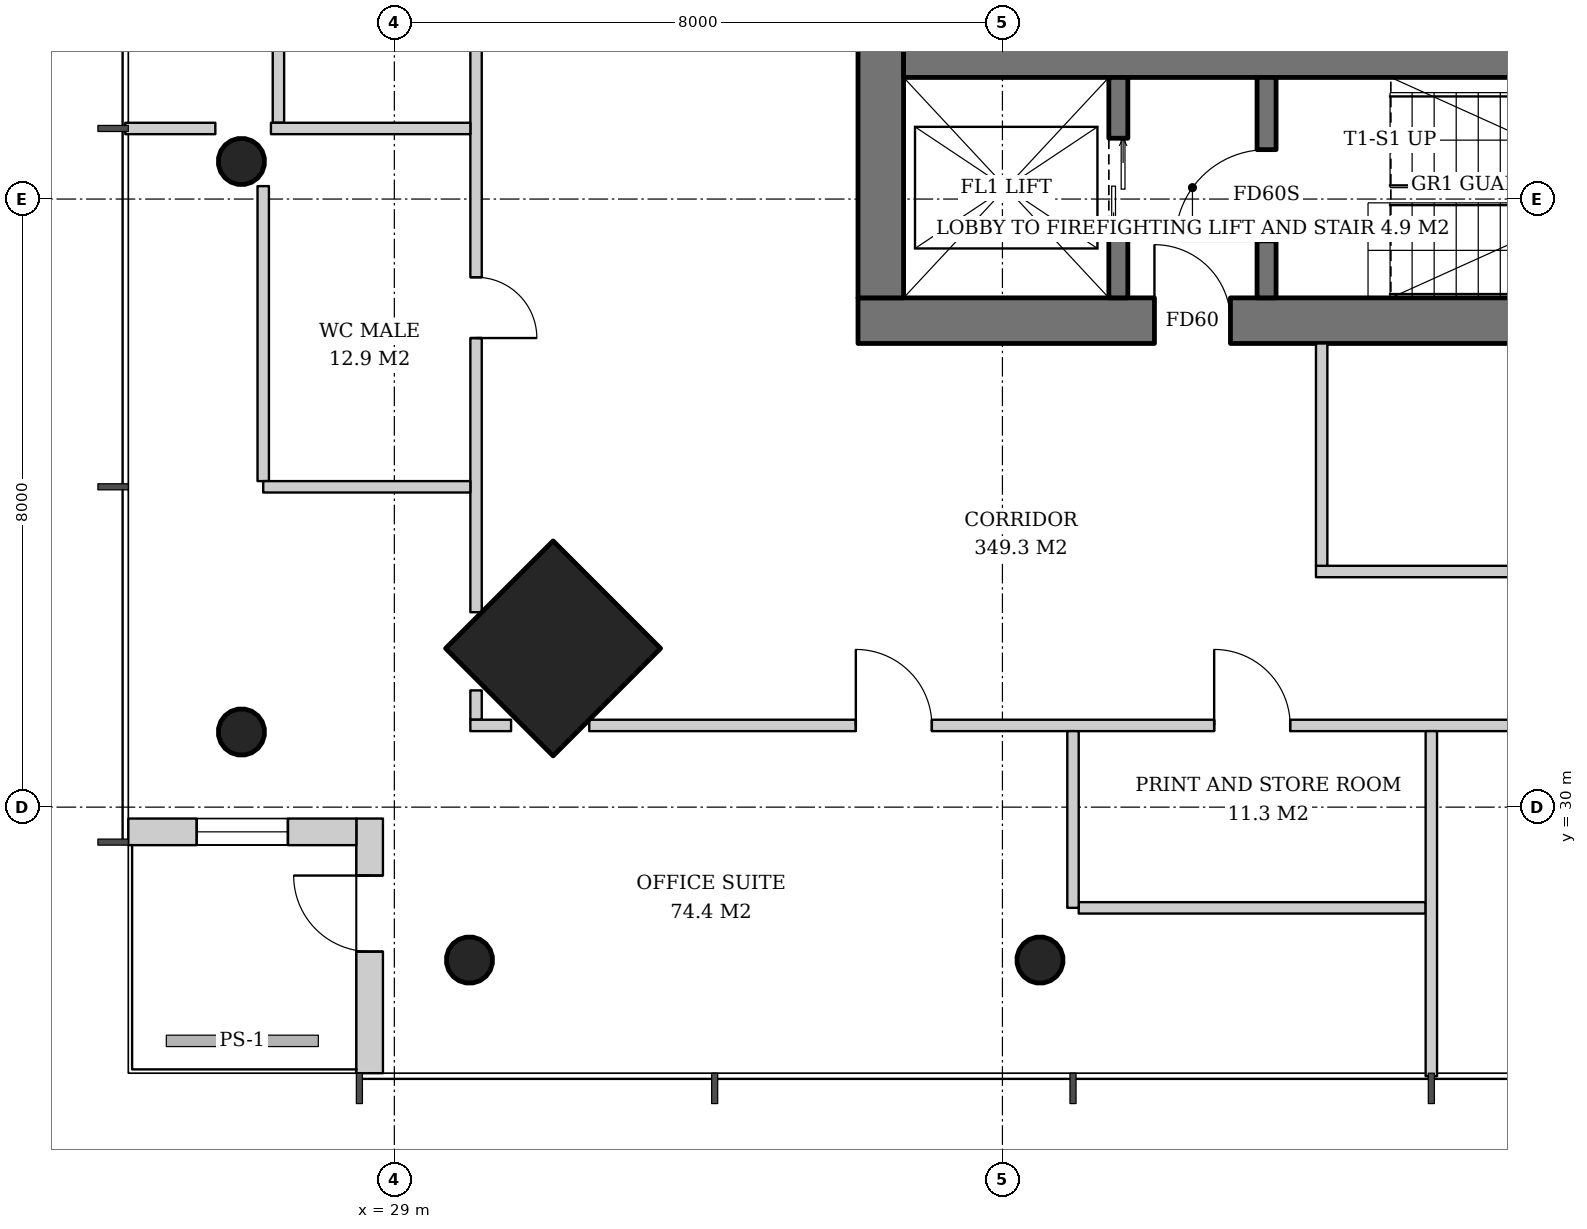
"""IFC4 building model, lengths in metres.
Left out: names, types, materials, properties, quantities, classifications, styles, units other than length and angle.
Written with IfcOpenShell. Run it as: python <this file> out.ifc"""

import sys

from ifc_helpers import new_model, si_unit, direction, frame, frame_2d, origin, origin_2d, place, context, subcontext, project, spatial, rectangle, hollow_circle, extrude, element, fill, save


model = new_model("IFC4")
c1 = context("Model", 3, precision=1e-05, world=origin(), true_north=direction((0.0, 1.0)))
c2 = subcontext(c1, "Body", "Model", "MODEL_VIEW")
j1 = project(units=[si_unit("LENGTHUNIT", "METRE"), si_unit("PLANEANGLEUNIT", "RADIAN")], contexts=[c1])
p1 = place(None, origin())
s1 = spatial("IfcSite", under=j1, at=p1, CompositionType="ELEMENT")
p2 = place(p1, origin())
s2 = spatial("IfcBuilding", under=s1, at=p2, CompositionType="ELEMENT")
p3 = place(p2, frame((0.0, 0.0, 207.2)))
s3 = spatial("IfcBuildingStorey", under=s2, at=p3, CompositionType="ELEMENT", Elevation=207.2)
p4 = place(p3, frame((31.05, 32.05, 0.0), z_axis=(0.031898107953, 0.031898107953, 0.998981992539), x_axis=(-0.707106781187, 0.707106781187, 0.0)))
e1 = element("IfcColumn", 1, at=p4, inside=s3, PredefinedType="COLUMN", context=c2, shape_type="SweptSolid", body=[
    extrude(rectangle(XDim=2.0, YDim=2.0, at=origin_2d()), origin(), (0.0, 0.0, 1.0), 3.804),
])
p5 = place(p3, frame((26.95, 30.95, 0.0), z_axis=(0.031962158256, 0.031962158256, 0.998977898093), x_axis=(-0.707106781187, 0.707106781187, 0.0)))
e2 = element("IfcColumn", 2, at=p5, inside=s3, PredefinedType="COLUMN", context=c2, shape_type="SweptSolid", body=[
    extrude(hollow_circle(Radius=0.305, WallThickness=0.025, at=origin_2d()), origin(), (0.0, 0.0, 1.0), 3.804),
])
p6 = place(p3, frame((26.95, 38.475, 0.0), z_axis=(0.031974442509, 0.015923015547, 0.999361842679), x_axis=(-0.445775033553, 0.895145027055, 0.0)))
e3 = element("IfcColumn", 3, at=p6, inside=s3, PredefinedType="COLUMN", context=c2, shape_type="SweptSolid", body=[
    extrude(hollow_circle(Radius=0.305, WallThickness=0.025, at=origin_2d()), origin(), (0.0, 0.0, 1.0), 3.802),
])
p7 = place(p3, frame((29.95, 27.95, 0.0), z_axis=(0.031962158256, 0.031962158256, 0.998977898093), x_axis=(-0.707106781187, 0.707106781187, 0.0)))
e4 = element("IfcColumn", 4, at=p7, inside=s3, PredefinedType="COLUMN", context=c2, shape_type="SweptSolid", body=[
    extrude(hollow_circle(Radius=0.305, WallThickness=0.025, at=origin_2d()), origin(), (0.0, 0.0, 1.0), 3.804),
])
p8 = place(p3, frame((37.475, 27.95, 0.0), z_axis=(0.015923015547, 0.031974442509, 0.999361842679), x_axis=(-0.895145027055, 0.445775033553, 0.0)))
e5 = element("IfcColumn", 5, at=p8, inside=s3, PredefinedType="COLUMN", context=c2, shape_type="SweptSolid", body=[
    extrude(hollow_circle(Radius=0.305, WallThickness=0.025, at=origin_2d()), origin(), (0.0, 0.0, 1.0), 3.802),
])
p9 = place(p3, frame((35.1, 36.4, 0.0), z_axis=(0.0, 0.0, 1.0), x_axis=(1.0, 0.0, 0.0)))
e6 = element("IfcWall", 6, at=p9, inside=s3, PredefinedType="SHEAR", context=c2, shape_type="SweptSolid", body=[
    extrude(rectangle(XDim=19.8, YDim=0.6, at=frame_2d((9.9, 0.0))), origin(), (0.0, 0.0, 1.0), 3.8),
])
p10 = place(p9, frame((3.9, 0.0, 0.0)))
e7 = element("IfcOpeningElement", 7, at=p10, cuts=e6, PredefinedType="OPENING", context=c2, shape_type="SweptSolid", body=[
    extrude(rectangle(XDim=1.0, YDim=2.1, at=frame_2d((0.5, 1.05))), frame((0.0, 0.31, 0.0), z_axis=(0.0, -1.0, 0.0), x_axis=(1.0, 0.0, 0.0)), (0.0, 0.0, 1.0), 0.62),
])
p11 = place(p9, frame((15.35, 0.0, 0.0)))
e8 = element("IfcOpeningElement", 8, at=p11, cuts=e6, PredefinedType="OPENING", context=c2, shape_type="SweptSolid", body=[
    extrude(rectangle(XDim=1.0, YDim=2.1, at=frame_2d((0.5, 1.05))), frame((0.0, 0.31, 0.0), z_axis=(0.0, -1.0, 0.0), x_axis=(1.0, 0.0, 0.0)), (0.0, 0.0, 1.0), 0.62),
])
p12 = place(p3, frame((35.4, 36.7, 0.0), z_axis=(0.0, 0.0, 1.0), x_axis=(0.0, 1.0, 0.0)))
e9 = element("IfcWall", 9, at=p12, inside=s3, PredefinedType="SHEAR", context=c2, shape_type="SweptSolid", body=[
    extrude(rectangle(XDim=18.6, YDim=0.6, at=frame_2d((9.3, 0.0))), origin(), (0.0, 0.0, 1.0), 3.8),
])
p13 = place(p12, frame((8.4, 0.0, 0.0)))
e10 = element("IfcOpeningElement", 10, at=p13, cuts=e9, PredefinedType="OPENING", context=c2, shape_type="SweptSolid", body=[
    extrude(rectangle(XDim=1.8, YDim=2.4, at=frame_2d((0.9, 1.2))), frame((0.0, 0.31, 0.0), z_axis=(0.0, -1.0, 0.0), x_axis=(1.0, 0.0, 0.0)), (0.0, 0.0, 1.0), 0.62),
])
p14 = place(p3, frame((35.7, 39.8, 0.0), z_axis=(0.0, 0.0, 1.0), x_axis=(1.0, 0.0, 0.0)))
e11 = element("IfcWall", 11, at=p14, inside=s3, PredefinedType="SHEAR", context=c2, shape_type="SweptSolid", body=[
    extrude(rectangle(XDim=18.6, YDim=0.4, at=frame_2d((9.3, 0.0))), origin(), (0.0, 0.0, 1.0), 3.8),
])
p15 = place(p3, frame((28.675, 26.5, 0.0), z_axis=(0.0, 0.0, 1.0), x_axis=(0.0, 1.0, 0.0)))
e12 = element("IfcWall", 12, at=p15, inside=s3, PredefinedType="SOLIDWALL", context=c2, shape_type="SweptSolid", body=[
    extrude(rectangle(XDim=3.35, YDim=0.35, at=frame_2d((1.675, 0.0))), origin(), (0.0, 0.0, 1.0), 3.62),
])
p16 = place(p15, frame((1.6, 0.0, 0.0)))
e13 = element("IfcOpeningElement", 13, at=p16, cuts=e12, PredefinedType="OPENING", context=c2, shape_type="SweptSolid", body=[
    extrude(rectangle(XDim=1.0, YDim=2.4, at=frame_2d((0.5, 1.2))), frame((0.0, 0.185, 0.0), z_axis=(0.0, -1.0, 0.0), x_axis=(1.0, 0.0, 0.0)), (0.0, 0.0, 1.0), 0.37),
])
p17 = place(p3, frame((28.5, 29.675, 0.0), z_axis=(0.0, 0.0, 1.0), x_axis=(-1.0, 0.0, 0.0)))
e14 = element("IfcWall", 14, at=p17, inside=s3, PredefinedType="SOLIDWALL", context=c2, shape_type="SweptSolid", body=[
    extrude(rectangle(XDim=3.0, YDim=0.35, at=frame_2d((1.5, 0.0))), origin(), (0.0, 0.0, 1.0), 3.62),
])
p18 = place(p17, frame((0.9, 0.0, 0.6)))
e15 = element("IfcOpeningElement", 15, at=p18, cuts=e14, PredefinedType="OPENING", context=c2, shape_type="SweptSolid", body=[
    extrude(rectangle(XDim=1.2, YDim=2.55, at=frame_2d((0.6, 1.275))), frame((0.0, 0.185, 0.0), z_axis=(0.0, -1.0, 0.0), x_axis=(1.0, 0.0, 0.0)), (0.0, 0.0, 1.0), 0.37),
])
p19 = place(p3, frame((38.525, 36.7, 0.0), z_axis=(0.0, 0.0, 1.0), x_axis=(0.0, 1.0, 0.0)))
e16 = element("IfcWall", 16, at=p19, inside=s3, PredefinedType="SHEAR", context=c2, shape_type="SweptSolid", body=[
    extrude(rectangle(XDim=2.9, YDim=0.25, at=frame_2d((1.45, 0.0))), origin(), (0.0, 0.0, 1.0), 3.8),
])
p20 = place(p19, frame((0.8, 0.0, 0.0)))
e17 = element("IfcOpeningElement", 17, at=p20, cuts=e16, PredefinedType="OPENING", context=c2, shape_type="SweptSolid", body=[
    extrude(rectangle(XDim=1.3, YDim=2.2, at=frame_2d((0.65, 1.1))), frame((0.0, 0.135, 0.0), z_axis=(0.0, -1.0, 0.0), x_axis=(1.0, 0.0, 0.0)), (0.0, 0.0, 1.0), 0.27),
])
p21 = place(p3, frame((40.475, 36.7, 0.0), z_axis=(0.0, 0.0, 1.0), x_axis=(0.0, 1.0, 0.0)))
e18 = element("IfcWall", 18, at=p21, inside=s3, PredefinedType="SHEAR", context=c2, shape_type="SweptSolid", body=[
    extrude(rectangle(XDim=2.9, YDim=0.25, at=frame_2d((1.45, 0.0))), origin(), (0.0, 0.0, 1.0), 3.8),
])
p22 = place(p21, frame((0.75, 0.0, 0.0)))
e19 = element("IfcOpeningElement", 19, at=p22, cuts=e18, PredefinedType="OPENING", context=c2, shape_type="SweptSolid", body=[
    extrude(rectangle(XDim=1.2, YDim=2.1, at=frame_2d((0.6, 1.05))), frame((0.0, 0.135, 0.0), z_axis=(0.0, -1.0, 0.0), x_axis=(1.0, 0.0, 0.0)), (0.0, 0.0, 1.0), 0.27),
])
p23 = place(p3, frame((41.125, 33.1, 0.0), z_axis=(0.0, 0.0, 1.0), x_axis=(1.0, 0.0, 0.0)))
e20 = element("IfcWall", 20, at=p23, inside=s3, PredefinedType="PARTITIONING", context=c2, shape_type="SweptSolid", body=[
    extrude(rectangle(XDim=8.2, YDim=0.15, at=frame_2d((4.1, 0.0))), origin(), (0.0, 0.0, 1.0), 2.867),
])
p24 = place(p23, frame((3.6, 0.0, 0.0)))
e21 = element("IfcOpeningElement", 21, at=p24, cuts=e20, PredefinedType="OPENING", context=c2, shape_type="SweptSolid", body=[
    extrude(rectangle(XDim=1.0, YDim=2.1, at=frame_2d((0.5, 1.05))), frame((0.0, 0.085, 0.0), z_axis=(0.0, -1.0, 0.0), x_axis=(1.0, 0.0, 0.0)), (0.0, 0.0, 1.0), 0.17),
])
p25 = place(p3, frame((41.2, 36.1, 0.0), z_axis=(0.0, 0.0, 1.0), x_axis=(0.0, -1.0, 0.0)))
e22 = element("IfcWall", 22, at=p25, inside=s3, PredefinedType="PARTITIONING", context=c2, shape_type="SweptSolid", body=[
    extrude(rectangle(XDim=2.925, YDim=0.15, at=frame_2d((1.462, 0.0))), origin(), (0.0, 0.0, 1.0), 3.62),
])
p26 = place(p3, frame((27.475, 43.568, 0.0), z_axis=(0.0, 0.0, 1.0), x_axis=(0.0, -1.0, 0.0)))
e23 = element("IfcWall", 23, at=p26, inside=s3, PredefinedType="PARTITIONING", context=c2, shape_type="SweptSolid", body=[
    extrude(rectangle(XDim=4.564, YDim=0.15, at=frame_2d((2.282, 0.0))), origin(), (0.0, 0.0, 1.0), 2.867),
])
p27 = place(p3, frame((27.275, 38.17, 0.0), z_axis=(0.0, 0.0, 1.0), x_axis=(0.0, -1.0, 0.0)))
e24 = element("IfcWall", 24, at=p27, inside=s3, PredefinedType="PARTITIONING", context=c2, shape_type="SweptSolid", body=[
    extrude(rectangle(XDim=3.881, YDim=0.15, at=frame_2d((1.94, 0.0))), origin(), (0.0, 0.0, 1.0), 2.867),
])
p28 = place(p3, frame((30.075, 59.436, 0.0), z_axis=(0.0, 0.0, 1.0), x_axis=(0.0, -1.0, 0.0)))
e25 = element("IfcWall", 25, at=p28, inside=s3, PredefinedType="PARTITIONING", context=c2, shape_type="SweptSolid", body=[
    extrude(rectangle(XDim=26.872, YDim=0.15, at=frame_2d((13.436, 0.0))), origin(), (0.0, 0.0, 1.0), 2.867),
])
p29 = place(p28, frame((3.507, 0.0, 0.0)))
e26 = element("IfcOpeningElement", 26, at=p29, cuts=e25, PredefinedType="OPENING", context=c2, shape_type="SweptSolid", body=[
    extrude(rectangle(XDim=1.0, YDim=2.1, at=frame_2d((0.5, 1.05))), frame((0.0, 0.085, 0.0), z_axis=(0.0, -1.0, 0.0), x_axis=(1.0, 0.0, 0.0)), (0.0, 0.0, 1.0), 0.17),
])
p30 = place(p28, frame((8.221, 0.0, 0.0)))
e27 = element("IfcOpeningElement", 27, at=p30, cuts=e25, PredefinedType="OPENING", context=c2, shape_type="SweptSolid", body=[
    extrude(rectangle(XDim=1.0, YDim=2.1, at=frame_2d((0.5, 1.05))), frame((0.0, 0.085, 0.0), z_axis=(0.0, -1.0, 0.0), x_axis=(1.0, 0.0, 0.0)), (0.0, 0.0, 1.0), 0.17),
])
p31 = place(p28, frame((13.036, 0.0, 0.0)))
e28 = element("IfcOpeningElement", 28, at=p31, cuts=e25, PredefinedType="OPENING", context=c2, shape_type="SweptSolid", body=[
    extrude(rectangle(XDim=0.8, YDim=2.1, at=frame_2d((0.4, 1.05))), frame((0.0, 0.085, 0.0), z_axis=(0.0, -1.0, 0.0), x_axis=(1.0, 0.0, 0.0)), (0.0, 0.0, 1.0), 0.17),
])
p32 = place(p28, frame((17.65, 0.0, 0.0)))
e29 = element("IfcOpeningElement", 29, at=p32, cuts=e25, PredefinedType="OPENING", context=c2, shape_type="SweptSolid", body=[
    extrude(rectangle(XDim=1.0, YDim=2.1, at=frame_2d((0.5, 1.05))), frame((0.0, 0.085, 0.0), z_axis=(0.0, -1.0, 0.0), x_axis=(1.0, 0.0, 0.0)), (0.0, 0.0, 1.0), 0.17),
])
p33 = place(p28, frame((22.464, 0.0, 0.0)))
e30 = element("IfcOpeningElement", 30, at=p33, cuts=e25, PredefinedType="OPENING", context=c2, shape_type="SweptSolid", body=[
    extrude(rectangle(XDim=0.8, YDim=2.1, at=frame_2d((0.4, 1.05))), frame((0.0, 0.085, 0.0), z_axis=(0.0, -1.0, 0.0), x_axis=(1.0, 0.0, 0.0)), (0.0, 0.0, 1.0), 0.17),
])
p34 = place(p3, frame((30.075, 31.536, 0.0), z_axis=(0.0, 0.0, 1.0), x_axis=(0.0, -1.0, 0.0)))
e31 = element("IfcWall", 31, at=p34, inside=s3, PredefinedType="PARTITIONING", context=c2, shape_type="SweptSolid", body=[
    extrude(rectangle(XDim=0.386, YDim=0.15, at=frame_2d((0.193, 0.0))), origin(), (0.0, 0.0, 1.0), 3.32),
])
p35 = place(p3, frame((30.0, 38.928, 0.0), z_axis=(0.0, 0.0, 1.0), x_axis=(-1.0, 0.0, 0.0)))
e32 = element("IfcWall", 32, at=p35, inside=s3, PredefinedType="PARTITIONING", context=c2, shape_type="SweptSolid", body=[
    extrude(rectangle(XDim=2.624, YDim=0.15, at=frame_2d((1.312, 0.0))), origin(), (0.0, 0.0, 1.0), 3.62),
])
p36 = place(p3, frame((26.645, 38.928, 0.0), z_axis=(0.0, 0.0, 1.0), x_axis=(-1.0, 0.0, 0.0)))
e33 = element("IfcWall", 33, at=p36, inside=s3, PredefinedType="PARTITIONING", context=c2, shape_type="SweptSolid", body=[
    extrude(rectangle(XDim=1.185, YDim=0.15, at=frame_2d((0.593, 0.0))), origin(), (0.0, 0.0, 1.0), 3.62),
])
p37 = place(p3, frame((30.0, 34.214, 0.0), z_axis=(0.0, 0.0, 1.0), x_axis=(-1.0, 0.0, 0.0)))
e34 = element("IfcWall", 34, at=p37, inside=s3, PredefinedType="PARTITIONING", context=c2, shape_type="SweptSolid", body=[
    extrude(rectangle(XDim=2.725, YDim=0.15, at=frame_2d((1.363, 0.0))), origin(), (0.0, 0.0, 1.0), 3.62),
])
p38 = place(p3, frame((38.004, 28.675, 0.0), z_axis=(0.0, 0.0, 1.0), x_axis=(1.0, 0.0, 0.0)))
e35 = element("IfcWall", 35, at=p38, inside=s3, PredefinedType="PARTITIONING", context=c2, shape_type="SweptSolid", body=[
    extrude(rectangle(XDim=4.564, YDim=0.15, at=frame_2d((2.282, 0.0))), origin(), (0.0, 0.0, 1.0), 2.867),
])
p39 = place(p3, frame((30.0, 31.075, 0.0), z_axis=(0.0, 0.0, 1.0), x_axis=(1.0, 0.0, 0.0)))
e36 = element("IfcWall", 36, at=p39, inside=s3, PredefinedType="PARTITIONING", context=c2, shape_type="SweptSolid", body=[
    extrude(rectangle(XDim=0.536, YDim=0.15, at=frame_2d((0.268, 0.0))), origin(), (0.0, 0.0, 1.0), 3.32),
])
p40 = place(p3, frame((31.564, 31.075, 0.0), z_axis=(0.0, 0.0, 1.0), x_axis=(1.0, 0.0, 0.0)))
e37 = element("IfcWall", 37, at=p40, inside=s3, PredefinedType="PARTITIONING", context=c2, shape_type="SweptSolid", body=[
    extrude(rectangle(XDim=26.872, YDim=0.15, at=frame_2d((13.436, 0.0))), origin(), (0.0, 0.0, 1.0), 2.867),
])
p41 = place(p40, frame((3.507, 0.0, 0.0)))
e38 = element("IfcOpeningElement", 38, at=p41, cuts=e37, PredefinedType="OPENING", context=c2, shape_type="SweptSolid", body=[
    extrude(rectangle(XDim=1.0, YDim=2.1, at=frame_2d((0.5, 1.05))), frame((0.0, 0.085, 0.0), z_axis=(0.0, -1.0, 0.0), x_axis=(1.0, 0.0, 0.0)), (0.0, 0.0, 1.0), 0.17),
])
p42 = place(p40, frame((8.221, 0.0, 0.0)))
e39 = element("IfcOpeningElement", 39, at=p42, cuts=e37, PredefinedType="OPENING", context=c2, shape_type="SweptSolid", body=[
    extrude(rectangle(XDim=1.0, YDim=2.1, at=frame_2d((0.5, 1.05))), frame((0.0, 0.085, 0.0), z_axis=(0.0, -1.0, 0.0), x_axis=(1.0, 0.0, 0.0)), (0.0, 0.0, 1.0), 0.17),
])
p43 = place(p40, frame((12.936, 0.0, 0.0)))
e40 = element("IfcOpeningElement", 40, at=p43, cuts=e37, PredefinedType="OPENING", context=c2, shape_type="SweptSolid", body=[
    extrude(rectangle(XDim=1.0, YDim=2.1, at=frame_2d((0.5, 1.05))), frame((0.0, 0.085, 0.0), z_axis=(0.0, -1.0, 0.0), x_axis=(1.0, 0.0, 0.0)), (0.0, 0.0, 1.0), 0.17),
])
p44 = place(p40, frame((17.65, 0.0, 0.0)))
e41 = element("IfcOpeningElement", 41, at=p44, cuts=e37, PredefinedType="OPENING", context=c2, shape_type="SweptSolid", body=[
    extrude(rectangle(XDim=1.0, YDim=2.1, at=frame_2d((0.5, 1.05))), frame((0.0, 0.085, 0.0), z_axis=(0.0, -1.0, 0.0), x_axis=(1.0, 0.0, 0.0)), (0.0, 0.0, 1.0), 0.17),
])
p45 = place(p40, frame((22.364, 0.0, 0.0)))
e42 = element("IfcOpeningElement", 42, at=p45, cuts=e37, PredefinedType="OPENING", context=c2, shape_type="SweptSolid", body=[
    extrude(rectangle(XDim=1.0, YDim=2.1, at=frame_2d((0.5, 1.05))), frame((0.0, 0.085, 0.0), z_axis=(0.0, -1.0, 0.0), x_axis=(1.0, 0.0, 0.0)), (0.0, 0.0, 1.0), 0.17),
])
p46 = place(p3, frame((37.928, 31.0, 0.0), z_axis=(0.0, 0.0, 1.0), x_axis=(0.0, -1.0, 0.0)))
e43 = element("IfcWall", 43, at=p46, inside=s3, PredefinedType="PARTITIONING", context=c2, shape_type="SweptSolid", body=[
    extrude(rectangle(XDim=2.325, YDim=0.15, at=frame_2d((1.163, 0.0))), origin(), (0.0, 0.0, 1.0), 3.62),
])
p47 = place(p3, frame((42.643, 31.0, 0.0), z_axis=(0.0, 0.0, 1.0), x_axis=(0.0, -1.0, 0.0)))
e44 = element("IfcWall", 44, at=p47, inside=s3, PredefinedType="PARTITIONING", context=c2, shape_type="SweptSolid", body=[
    extrude(rectangle(XDim=4.54, YDim=0.15, at=frame_2d((2.27, 0.0))), origin(), (0.0, 0.0, 1.0), 3.12),
])
p48 = place(p16, origin())
e45 = element("IfcDoor", 45, at=p48, inside=s3, OperationType="SINGLE_SWING_RIGHT", PredefinedType="DOOR", context=c2, shape_type="SweptSolid", body=[
    extrude(rectangle(XDim=1.0, YDim=2.4, at=frame_2d((0.5, 1.2))), frame((0.0, 0.025, 0.0), z_axis=(0.0, -1.0, 0.0), x_axis=(1.0, 0.0, 0.0)), (0.0, 0.0, 1.0), 0.05),
])
fill(e13, e45)
p49 = place(p18, origin())
e46 = element("IfcWindow", 46, at=p49, inside=s3, PartitioningType="SINGLE_PANEL", PredefinedType="WINDOW", context=c2, shape_type="SweptSolid", body=[
    extrude(rectangle(XDim=1.2, YDim=2.55, at=frame_2d((0.6, 1.275))), frame((0.0, 0.03, 0.0), z_axis=(0.0, -1.0, 0.0), x_axis=(1.0, 0.0, 0.0)), (0.0, 0.0, 1.0), 0.06),
])
fill(e15, e46)
p50 = place(p20, origin())
e47 = element("IfcDoor", 47, at=p50, inside=s3, OperationType="DOUBLE_DOOR_SLIDING", PredefinedType="DOOR", context=c2, shape_type="SweptSolid", body=[
    extrude(rectangle(XDim=1.3, YDim=2.2, at=frame_2d((0.65, 1.1))), frame((0.0, 0.025, 0.0), z_axis=(0.0, -1.0, 0.0), x_axis=(1.0, 0.0, 0.0)), (0.0, 0.0, 1.0), 0.05),
])
fill(e17, e47)
p51 = place(p22, origin())
e48 = element("IfcDoor", 48, at=p51, inside=s3, OperationType="SINGLE_SWING_LEFT", PredefinedType="DOOR", context=c2, shape_type="SweptSolid", body=[
    extrude(rectangle(XDim=1.2, YDim=2.1, at=frame_2d((0.6, 1.05))), frame((0.0, 0.025, 0.0), z_axis=(0.0, -1.0, 0.0), x_axis=(1.0, 0.0, 0.0)), (0.0, 0.0, 1.0), 0.05),
])
fill(e19, e48)
p52 = place(p10, origin())
e49 = element("IfcDoor", 49, at=p52, inside=s3, OperationType="SINGLE_SWING_LEFT", PredefinedType="DOOR", context=c2, shape_type="SweptSolid", body=[
    extrude(rectangle(XDim=1.0, YDim=2.1, at=frame_2d((0.5, 1.05))), frame((0.0, 0.025, 0.0), z_axis=(0.0, -1.0, 0.0), x_axis=(1.0, 0.0, 0.0)), (0.0, 0.0, 1.0), 0.05),
])
fill(e7, e49)
p53 = place(p33, origin())
e50 = element("IfcDoor", 50, at=p53, inside=s3, OperationType="SINGLE_SWING_RIGHT", PredefinedType="DOOR", context=c2, shape_type="SweptSolid", body=[
    extrude(rectangle(XDim=0.8, YDim=2.1, at=frame_2d((0.4, 1.05))), frame((0.0, 0.025, 0.0), z_axis=(0.0, -1.0, 0.0), x_axis=(1.0, 0.0, 0.0)), (0.0, 0.0, 1.0), 0.05),
])
fill(e30, e50)
p54 = place(p41, origin())
e51 = element("IfcDoor", 51, at=p54, inside=s3, OperationType="SINGLE_SWING_LEFT", PredefinedType="DOOR", context=c2, shape_type="SweptSolid", body=[
    extrude(rectangle(XDim=1.0, YDim=2.1, at=frame_2d((0.5, 1.05))), frame((0.0, 0.025, 0.0), z_axis=(0.0, -1.0, 0.0), x_axis=(1.0, 0.0, 0.0)), (0.0, 0.0, 1.0), 0.05),
])
fill(e38, e51)
p55 = place(p42, origin())
e52 = element("IfcDoor", 52, at=p55, inside=s3, OperationType="SINGLE_SWING_LEFT", PredefinedType="DOOR", context=c2, shape_type="SweptSolid", body=[
    extrude(rectangle(XDim=1.0, YDim=2.1, at=frame_2d((0.5, 1.05))), frame((0.0, 0.025, 0.0), z_axis=(0.0, -1.0, 0.0), x_axis=(1.0, 0.0, 0.0)), (0.0, 0.0, 1.0), 0.05),
])
fill(e39, e52)
save(model, sys.argv[1])
